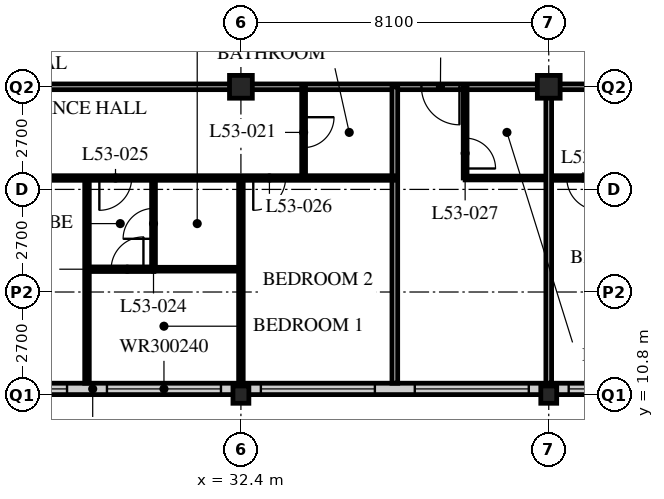
"""IFC4 building model, lengths in metres.
Left out: names, types, materials, properties, quantities, classifications, styles, units other than length and angle.
Written with IfcOpenShell. Run it as: python <this file> out.ifc"""

import sys

from ifc_helpers import new_model, si_unit, direction, frame, frame_2d, origin, origin_2d, place, context, subcontext, project, spatial, rectangle, hollow_rectangle, i_section, extrude, element, fill, save


model = new_model("IFC4")
c1 = context("Model", 3, precision=1e-05, world=origin(), true_north=direction((0.0, 1.0)))
c2 = subcontext(c1, "Body", "Model", "MODEL_VIEW")
j1 = project(units=[si_unit("LENGTHUNIT", "METRE"), si_unit("PLANEANGLEUNIT", "RADIAN")], contexts=[c1])
p1 = place(None, origin())
s1 = spatial("IfcSite", under=j1, at=p1, CompositionType="ELEMENT")
p2 = place(p1, origin())
s2 = spatial("IfcBuilding", under=s1, at=p2, CompositionType="ELEMENT")
p3 = place(p2, frame((0.0, 0.0, 206.4)))
s3 = spatial("IfcBuildingStorey", under=s2, at=p3, CompositionType="ELEMENT", Elevation=206.4)
p4 = place(p3, frame((32.4, 10.8, 0.0), z_axis=(0.0, 0.0, 1.0), x_axis=(1.0, 0.0, 0.0)))
e1 = element("IfcColumn", 1, at=p4, inside=s3, PredefinedType="COLUMN", context=c2, shape_type="SweptSolid", body=[
    extrude(i_section(OverallWidth=0.418, OverallDepth=0.456, WebThickness=0.042, FlangeThickness=0.067, FilletRadius=0.015, at=origin_2d()), origin(), (0.0, 0.0, 1.0), 3.6),
])
p5 = place(p3, frame((32.4, 18.9, 0.0), z_axis=(0.0, 0.0, 1.0), x_axis=(1.0, 0.0, 0.0)))
e2 = element("IfcColumn", 2, at=p5, inside=s3, PredefinedType="COLUMN", context=c2, shape_type="SweptSolid", body=[
    extrude(hollow_rectangle(XDim=0.6, YDim=0.6, WallThickness=0.05, at=origin_2d()), origin(), (0.0, 0.0, 1.0), 3.6),
])
p6 = place(p3, frame((40.5, 10.8, 0.0), z_axis=(0.0, 0.0, 1.0), x_axis=(1.0, 0.0, 0.0)))
e3 = element("IfcColumn", 3, at=p6, inside=s3, PredefinedType="COLUMN", context=c2, shape_type="SweptSolid", body=[
    extrude(i_section(OverallWidth=0.418, OverallDepth=0.456, WebThickness=0.042, FlangeThickness=0.067, FilletRadius=0.015, at=origin_2d()), origin(), (0.0, 0.0, 1.0), 3.6),
])
p7 = place(p3, frame((40.5, 18.9, 0.0), z_axis=(0.0, 0.0, 1.0), x_axis=(1.0, 0.0, 0.0)))
e4 = element("IfcColumn", 4, at=p7, inside=s3, PredefinedType="COLUMN", context=c2, shape_type="SweptSolid", body=[
    extrude(hollow_rectangle(XDim=0.6, YDim=0.6, WallThickness=0.05, at=origin_2d()), origin(), (0.0, 0.0, 1.0), 3.6),
])
p8 = place(p3, frame((8.4, 10.95, 0.0), z_axis=(0.0, 0.0, 1.0), x_axis=(1.0, 0.0, 0.0)))
e5 = element("IfcWall", 5, at=p8, inside=s3, PredefinedType="SOLIDWALL", context=c2, shape_type="SweptSolid", body=[
    extrude(rectangle(XDim=40.2, YDim=0.3, at=frame_2d((20.1, 0.0))), origin(), (0.0, 0.0, 1.0), 3.39),
])
p9 = place(p8, frame((0.225, 0.0, 0.6)))
e6 = element("IfcOpeningElement", 6, at=p9, cuts=e5, PredefinedType="OPENING", context=c2, shape_type="SweptSolid", body=[
    extrude(rectangle(XDim=3.0, YDim=2.4, at=frame_2d((1.5, 1.2))), frame((0.0, 0.16, 0.0), z_axis=(0.0, -1.0, 0.0), x_axis=(1.0, 0.0, 0.0)), (0.0, 0.0, 1.0), 0.32),
])
p10 = place(p8, frame((4.275, 0.0, 0.6)))
e7 = element("IfcOpeningElement", 7, at=p10, cuts=e5, PredefinedType="OPENING", context=c2, shape_type="SweptSolid", body=[
    extrude(rectangle(XDim=3.0, YDim=2.4, at=frame_2d((1.5, 1.2))), frame((0.0, 0.16, 0.0), z_axis=(0.0, -1.0, 0.0), x_axis=(1.0, 0.0, 0.0)), (0.0, 0.0, 1.0), 0.32),
])
p11 = place(p8, frame((8.325, 0.0, 0.6)))
e8 = element("IfcOpeningElement", 8, at=p11, cuts=e5, PredefinedType="OPENING", context=c2, shape_type="SweptSolid", body=[
    extrude(rectangle(XDim=3.0, YDim=2.4, at=frame_2d((1.5, 1.2))), frame((0.0, 0.16, 0.0), z_axis=(0.0, -1.0, 0.0), x_axis=(1.0, 0.0, 0.0)), (0.0, 0.0, 1.0), 0.32),
])
p12 = place(p8, frame((12.375, 0.0, 0.6)))
e9 = element("IfcOpeningElement", 9, at=p12, cuts=e5, PredefinedType="OPENING", context=c2, shape_type="SweptSolid", body=[
    extrude(rectangle(XDim=3.0, YDim=2.4, at=frame_2d((1.5, 1.2))), frame((0.0, 0.16, 0.0), z_axis=(0.0, -1.0, 0.0), x_axis=(1.0, 0.0, 0.0)), (0.0, 0.0, 1.0), 0.32),
])
p13 = place(p8, frame((16.425, 0.0, 0.6)))
e10 = element("IfcOpeningElement", 10, at=p13, cuts=e5, PredefinedType="OPENING", context=c2, shape_type="SweptSolid", body=[
    extrude(rectangle(XDim=3.0, YDim=2.4, at=frame_2d((1.5, 1.2))), frame((0.0, 0.16, 0.0), z_axis=(0.0, -1.0, 0.0), x_axis=(1.0, 0.0, 0.0)), (0.0, 0.0, 1.0), 0.32),
])
p14 = place(p8, frame((20.475, 0.0, 0.6)))
e11 = element("IfcOpeningElement", 11, at=p14, cuts=e5, PredefinedType="OPENING", context=c2, shape_type="SweptSolid", body=[
    extrude(rectangle(XDim=3.0, YDim=2.4, at=frame_2d((1.5, 1.2))), frame((0.0, 0.16, 0.0), z_axis=(0.0, -1.0, 0.0), x_axis=(1.0, 0.0, 0.0)), (0.0, 0.0, 1.0), 0.32),
])
p15 = place(p8, frame((24.525, 0.0, 0.6)))
e12 = element("IfcOpeningElement", 12, at=p15, cuts=e5, PredefinedType="OPENING", context=c2, shape_type="SweptSolid", body=[
    extrude(rectangle(XDim=3.0, YDim=2.4, at=frame_2d((1.5, 1.2))), frame((0.0, 0.16, 0.0), z_axis=(0.0, -1.0, 0.0), x_axis=(1.0, 0.0, 0.0)), (0.0, 0.0, 1.0), 0.32),
])
p16 = place(p8, frame((28.575, 0.0, 0.6)))
e13 = element("IfcOpeningElement", 13, at=p16, cuts=e5, PredefinedType="OPENING", context=c2, shape_type="SweptSolid", body=[
    extrude(rectangle(XDim=3.0, YDim=2.4, at=frame_2d((1.5, 1.2))), frame((0.0, 0.16, 0.0), z_axis=(0.0, -1.0, 0.0), x_axis=(1.0, 0.0, 0.0)), (0.0, 0.0, 1.0), 0.32),
])
p17 = place(p8, frame((32.625, 0.0, 0.6)))
e14 = element("IfcOpeningElement", 14, at=p17, cuts=e5, PredefinedType="OPENING", context=c2, shape_type="SweptSolid", body=[
    extrude(rectangle(XDim=3.0, YDim=2.4, at=frame_2d((1.5, 1.2))), frame((0.0, 0.16, 0.0), z_axis=(0.0, -1.0, 0.0), x_axis=(1.0, 0.0, 0.0)), (0.0, 0.0, 1.0), 0.32),
])
p18 = place(p8, frame((36.675, 0.0, 0.6)))
e15 = element("IfcOpeningElement", 15, at=p18, cuts=e5, PredefinedType="OPENING", context=c2, shape_type="SweptSolid", body=[
    extrude(rectangle(XDim=3.0, YDim=2.4, at=frame_2d((1.5, 1.2))), frame((0.0, 0.16, 0.0), z_axis=(0.0, -1.0, 0.0), x_axis=(1.0, 0.0, 0.0)), (0.0, 0.0, 1.0), 0.32),
])
p19 = place(p3, frame((8.1, 18.9, 0.0), z_axis=(0.0, 0.0, 1.0), x_axis=(1.0, 0.0, 0.0)))
e16 = element("IfcWall", 16, at=p19, inside=s3, PredefinedType="PARTITIONING", context=c2, shape_type="SweptSolid", body=[
    extrude(rectangle(XDim=36.45, YDim=0.15, at=frame_2d((18.225, 0.0))), origin(), (0.0, 0.0, 1.0), 2.778),
])
p20 = place(p19, frame((4.45, 0.0, 0.0)))
e17 = element("IfcOpeningElement", 17, at=p20, cuts=e16, PredefinedType="OPENING", context=c2, shape_type="SweptSolid", body=[
    extrude(rectangle(XDim=1.0, YDim=2.1, at=frame_2d((0.5, 1.05))), frame((0.0, 0.085, 0.0), z_axis=(0.0, -1.0, 0.0), x_axis=(1.0, 0.0, 0.0)), (0.0, 0.0, 1.0), 0.17),
])
p21 = place(p19, frame((12.55, 0.0, 0.0)))
e18 = element("IfcOpeningElement", 18, at=p21, cuts=e16, PredefinedType="OPENING", context=c2, shape_type="SweptSolid", body=[
    extrude(rectangle(XDim=1.0, YDim=2.1, at=frame_2d((0.5, 1.05))), frame((0.0, 0.085, 0.0), z_axis=(0.0, -1.0, 0.0), x_axis=(1.0, 0.0, 0.0)), (0.0, 0.0, 1.0), 0.17),
])
p22 = place(p19, frame((29.05, 0.0, 0.0)))
e19 = element("IfcOpeningElement", 19, at=p22, cuts=e16, PredefinedType="OPENING", context=c2, shape_type="SweptSolid", body=[
    extrude(rectangle(XDim=1.0, YDim=2.1, at=frame_2d((0.5, 1.05))), frame((0.0, 0.085, 0.0), z_axis=(0.0, -1.0, 0.0), x_axis=(1.0, 0.0, 0.0)), (0.0, 0.0, 1.0), 0.17),
])
p23 = place(p19, frame((2.625, 0.0, 0.0)))
e20 = element("IfcOpeningElement", 20, at=p23, cuts=e16, PredefinedType="OPENING", context=c2, shape_type="SweptSolid", body=[
    extrude(rectangle(XDim=1.0, YDim=2.1, at=frame_2d((0.5, 1.05))), frame((0.0, 0.085, 0.0), z_axis=(0.0, -1.0, 0.0), x_axis=(1.0, 0.0, 0.0)), (0.0, 0.0, 1.0), 0.17),
])
p24 = place(p19, frame((33.925, 0.0, 0.0)))
e21 = element("IfcOpeningElement", 21, at=p24, cuts=e16, PredefinedType="OPENING", context=c2, shape_type="SweptSolid", body=[
    extrude(rectangle(XDim=1.0, YDim=2.1, at=frame_2d((0.5, 1.05))), frame((0.0, 0.085, 0.0), z_axis=(0.0, -1.0, 0.0), x_axis=(1.0, 0.0, 0.0)), (0.0, 0.0, 1.0), 0.17),
])
p25 = place(p3, frame((34.05, 18.9, 0.0), z_axis=(0.0, 0.0, 1.0), x_axis=(0.0, -1.0, 0.0)))
e22 = element("IfcWall", 22, at=p25, inside=s3, PredefinedType="PARTITIONING", context=c2, shape_type="SweptSolid", body=[
    extrude(rectangle(XDim=2.4, YDim=0.1, at=frame_2d((1.2, 0.0))), origin(), (0.0, 0.0, 1.0), 3.39),
])
p26 = place(p25, frame((0.8, 0.0, 0.0)))
e23 = element("IfcOpeningElement", 23, at=p26, cuts=e22, PredefinedType="OPENING", context=c2, shape_type="SweptSolid", body=[
    extrude(rectangle(XDim=0.8, YDim=2.1, at=frame_2d((0.4, 1.05))), frame((0.0, 0.06, 0.0), z_axis=(0.0, -1.0, 0.0), x_axis=(1.0, 0.0, 0.0)), (0.0, 0.0, 1.0), 0.12),
])
p27 = place(p3, frame((30.1, 16.5, 0.0), z_axis=(0.0, 0.0, 1.0), x_axis=(0.0, -1.0, 0.0)))
e24 = element("IfcWall", 24, at=p27, inside=s3, PredefinedType="PARTITIONING", context=c2, shape_type="SweptSolid", body=[
    extrude(rectangle(XDim=2.4, YDim=0.1, at=frame_2d((1.2, 0.0))), origin(), (0.0, 0.0, 1.0), 3.39),
])
p28 = place(p27, frame((0.8, 0.0, 0.0)))
e25 = element("IfcOpeningElement", 25, at=p28, cuts=e24, PredefinedType="OPENING", context=c2, shape_type="SweptSolid", body=[
    extrude(rectangle(XDim=0.8, YDim=2.1, at=frame_2d((0.4, 1.05))), frame((0.0, 0.06, 0.0), z_axis=(0.0, -1.0, 0.0), x_axis=(1.0, 0.0, 0.0)), (0.0, 0.0, 1.0), 0.12),
])
p29 = place(p3, frame((30.1, 14.1, 0.0), z_axis=(0.0, 0.0, 1.0), x_axis=(1.0, 0.0, 0.0)))
e26 = element("IfcWall", 26, at=p29, inside=s3, PredefinedType="PARTITIONING", context=c2, shape_type="SweptSolid", body=[
    extrude(rectangle(XDim=2.3, YDim=0.1, at=frame_2d((1.15, 0.0))), origin(), (0.0, 0.0, 1.0), 3.39),
])
p30 = place(p3, frame((28.35, 16.5, 0.0), z_axis=(0.0, 0.0, 1.0), x_axis=(0.0, -1.0, 0.0)))
e27 = element("IfcWall", 27, at=p30, inside=s3, PredefinedType="PARTITIONING", context=c2, shape_type="SweptSolid", body=[
    extrude(rectangle(XDim=5.4, YDim=0.12, at=frame_2d((2.7, 0.0))), origin(), (0.0, 0.0, 1.0), 3.39),
])
p31 = place(p3, frame((32.4, 16.5, 0.0), z_axis=(0.0, 0.0, 1.0), x_axis=(0.0, -1.0, 0.0)))
e28 = element("IfcWall", 28, at=p31, inside=s3, PredefinedType="PARTITIONING", context=c2, shape_type="SweptSolid", body=[
    extrude(rectangle(XDim=5.4, YDim=0.12, at=frame_2d((2.7, 0.0))), origin(), (0.0, 0.0, 1.0), 2.778),
])
p32 = place(p3, frame((36.45, 18.9, 0.0), z_axis=(0.0, 0.0, 1.0), x_axis=(0.0, -1.0, 0.0)))
e29 = element("IfcWall", 29, at=p32, inside=s3, PredefinedType="PARTITIONING", context=c2, shape_type="SweptSolid", body=[
    extrude(rectangle(XDim=7.8, YDim=0.15, at=frame_2d((3.9, 0.0))), origin(), (0.0, 0.0, 1.0), 3.39),
])
p33 = place(p3, frame((38.3, 16.5, 0.0), z_axis=(0.0, 0.0, 1.0), x_axis=(1.0, 0.0, 0.0)))
e30 = element("IfcWall", 30, at=p33, inside=s3, PredefinedType="PARTITIONING", context=c2, shape_type="SweptSolid", body=[
    extrude(rectangle(XDim=2.2, YDim=0.1, at=frame_2d((1.1, 0.0))), origin(), (0.0, 0.0, 1.0), 3.39),
])
p34 = place(p3, frame((38.3, 18.9, 0.0), z_axis=(0.0, 0.0, 1.0), x_axis=(0.0, -1.0, 0.0)))
e31 = element("IfcWall", 31, at=p34, inside=s3, PredefinedType="PARTITIONING", context=c2, shape_type="SweptSolid", body=[
    extrude(rectangle(XDim=2.4, YDim=0.1, at=frame_2d((1.2, 0.0))), origin(), (0.0, 0.0, 1.0), 3.39),
])
p35 = place(p34, frame((1.35, 0.0, 0.0)))
e32 = element("IfcOpeningElement", 32, at=p35, cuts=e31, PredefinedType="OPENING", context=c2, shape_type="SweptSolid", body=[
    extrude(rectangle(XDim=0.8, YDim=2.1, at=frame_2d((0.4, 1.05))), frame((0.0, 0.06, 0.0), z_axis=(0.0, -1.0, 0.0), x_axis=(1.0, 0.0, 0.0)), (0.0, 0.0, 1.0), 0.12),
])
p36 = place(p3, frame((8.1, 16.5, 0.0), z_axis=(0.0, 0.0, 1.0), x_axis=(1.0, 0.0, 0.0)))
e33 = element("IfcWall", 33, at=p36, inside=s3, PredefinedType="PARTITIONING", context=c2, shape_type="SweptSolid", body=[
    extrude(rectangle(XDim=28.35, YDim=0.12, at=frame_2d((14.175, 0.0))), origin(), (0.0, 0.0, 1.0), 3.39),
])
p37 = place(p36, frame((5.025, 0.0, 0.0)))
e34 = element("IfcOpeningElement", 34, at=p37, cuts=e33, PredefinedType="OPENING", context=c2, shape_type="SweptSolid", body=[
    extrude(rectangle(XDim=0.85, YDim=2.1, at=frame_2d((0.425, 1.05))), frame((0.0, 0.07, 0.0), z_axis=(0.0, -1.0, 0.0), x_axis=(1.0, 0.0, 0.0)), (0.0, 0.0, 1.0), 0.14),
])
p38 = place(p36, frame((8.425, 0.0, 0.0)))
e35 = element("IfcOpeningElement", 35, at=p38, cuts=e33, PredefinedType="OPENING", context=c2, shape_type="SweptSolid", body=[
    extrude(rectangle(XDim=0.85, YDim=2.1, at=frame_2d((0.425, 1.05))), frame((0.0, 0.07, 0.0), z_axis=(0.0, -1.0, 0.0), x_axis=(1.0, 0.0, 0.0)), (0.0, 0.0, 1.0), 0.14),
])
p39 = place(p36, frame((13.125, 0.0, 0.0)))
e36 = element("IfcOpeningElement", 36, at=p39, cuts=e33, PredefinedType="OPENING", context=c2, shape_type="SweptSolid", body=[
    extrude(rectangle(XDim=0.85, YDim=2.1, at=frame_2d((0.425, 1.05))), frame((0.0, 0.07, 0.0), z_axis=(0.0, -1.0, 0.0), x_axis=(1.0, 0.0, 0.0)), (0.0, 0.0, 1.0), 0.14),
])
p40 = place(p36, frame((20.575, 0.0, 0.0)))
e37 = element("IfcOpeningElement", 37, at=p40, cuts=e33, PredefinedType="OPENING", context=c2, shape_type="SweptSolid", body=[
    extrude(rectangle(XDim=0.85, YDim=2.1, at=frame_2d((0.425, 1.05))), frame((0.0, 0.07, 0.0), z_axis=(0.0, -1.0, 0.0), x_axis=(1.0, 0.0, 0.0)), (0.0, 0.0, 1.0), 0.14),
])
p41 = place(p36, frame((24.625, 0.0, 0.0)))
e38 = element("IfcOpeningElement", 38, at=p41, cuts=e33, PredefinedType="OPENING", context=c2, shape_type="SweptSolid", body=[
    extrude(rectangle(XDim=0.85, YDim=2.1, at=frame_2d((0.425, 1.05))), frame((0.0, 0.07, 0.0), z_axis=(0.0, -1.0, 0.0), x_axis=(1.0, 0.0, 0.0)), (0.0, 0.0, 1.0), 0.14),
])
p42 = place(p36, frame((2.725, 0.0, 0.0)))
e39 = element("IfcOpeningElement", 39, at=p42, cuts=e33, PredefinedType="OPENING", context=c2, shape_type="SweptSolid", body=[
    extrude(rectangle(XDim=0.85, YDim=2.1, at=frame_2d((0.425, 1.05))), frame((0.0, 0.07, 0.0), z_axis=(0.0, -1.0, 0.0), x_axis=(1.0, 0.0, 0.0)), (0.0, 0.0, 1.0), 0.14),
])
p43 = place(p3, frame((40.5, 16.5, 0.0), z_axis=(0.0, 0.0, 1.0), x_axis=(1.0, 0.0, 0.0)))
e40 = element("IfcWall", 40, at=p43, inside=s3, PredefinedType="PARTITIONING", context=c2, shape_type="SweptSolid", body=[
    extrude(rectangle(XDim=8.05, YDim=0.12, at=frame_2d((4.025, 0.0))), origin(), (0.0, 0.0, 1.0), 3.39),
])
p44 = place(p43, frame((0.475, 0.0, 0.0)))
e41 = element("IfcOpeningElement", 41, at=p44, cuts=e40, PredefinedType="OPENING", context=c2, shape_type="SweptSolid", body=[
    extrude(rectangle(XDim=0.85, YDim=2.1, at=frame_2d((0.425, 1.05))), frame((0.0, 0.07, 0.0), z_axis=(0.0, -1.0, 0.0), x_axis=(1.0, 0.0, 0.0)), (0.0, 0.0, 1.0), 0.14),
])
p45 = place(p43, frame((4.325, 0.0, 0.0)))
e42 = element("IfcOpeningElement", 42, at=p45, cuts=e40, PredefinedType="OPENING", context=c2, shape_type="SweptSolid", body=[
    extrude(rectangle(XDim=0.85, YDim=2.1, at=frame_2d((0.425, 1.05))), frame((0.0, 0.07, 0.0), z_axis=(0.0, -1.0, 0.0), x_axis=(1.0, 0.0, 0.0)), (0.0, 0.0, 1.0), 0.14),
])
p46 = place(p3, frame((40.5, 18.9, 0.0), z_axis=(0.0, 0.0, 1.0), x_axis=(0.0, -1.0, 0.0)))
e43 = element("IfcWall", 43, at=p46, inside=s3, PredefinedType="PARTITIONING", context=c2, shape_type="SweptSolid", body=[
    extrude(rectangle(XDim=7.8, YDim=0.15, at=frame_2d((3.9, 0.0))), origin(), (0.0, 0.0, 1.0), 2.778),
])
p47 = place(p3, frame((30.11, 14.1, 0.0), z_axis=(0.0, 0.0, 1.0), x_axis=(-1.0, 0.0, 0.0)))
e44 = element("IfcWall", 44, at=p47, inside=s3, PredefinedType="PARTITIONING", context=c2, shape_type="SweptSolid", body=[
    extrude(rectangle(XDim=1.76, YDim=0.12, at=frame_2d((0.88, 0.0))), origin(), (0.0, 0.0, 1.0), 3.39),
])
p48 = place(p47, frame((0.275, 0.0, 0.0)))
e45 = element("IfcOpeningElement", 45, at=p48, cuts=e44, PredefinedType="OPENING", context=c2, shape_type="SweptSolid", body=[
    extrude(rectangle(XDim=0.85, YDim=2.1, at=frame_2d((0.425, 1.05))), frame((0.0, 0.07, 0.0), z_axis=(0.0, -1.0, 0.0), x_axis=(1.0, 0.0, 0.0)), (0.0, 0.0, 1.0), 0.14),
])
p49 = place(p13, origin())
e46 = element("IfcWindow", 46, at=p49, inside=s3, PartitioningType="SINGLE_PANEL", PredefinedType="WINDOW", context=c2, shape_type="SweptSolid", body=[
    extrude(rectangle(XDim=3.0, YDim=2.4, at=frame_2d((1.5, 1.2))), frame((0.0, 0.03, 0.0), z_axis=(0.0, -1.0, 0.0), x_axis=(1.0, 0.0, 0.0)), (0.0, 0.0, 1.0), 0.06),
])
fill(e10, e46)
p50 = place(p14, origin())
e47 = element("IfcWindow", 47, at=p50, inside=s3, PartitioningType="SINGLE_PANEL", PredefinedType="WINDOW", context=c2, shape_type="SweptSolid", body=[
    extrude(rectangle(XDim=3.0, YDim=2.4, at=frame_2d((1.5, 1.2))), frame((0.0, 0.03, 0.0), z_axis=(0.0, -1.0, 0.0), x_axis=(1.0, 0.0, 0.0)), (0.0, 0.0, 1.0), 0.06),
])
fill(e11, e47)
p51 = place(p15, origin())
e48 = element("IfcWindow", 48, at=p51, inside=s3, PartitioningType="SINGLE_PANEL", PredefinedType="WINDOW", context=c2, shape_type="SweptSolid", body=[
    extrude(rectangle(XDim=3.0, YDim=2.4, at=frame_2d((1.5, 1.2))), frame((0.0, 0.03, 0.0), z_axis=(0.0, -1.0, 0.0), x_axis=(1.0, 0.0, 0.0)), (0.0, 0.0, 1.0), 0.06),
])
fill(e12, e48)
p52 = place(p16, origin())
e49 = element("IfcWindow", 49, at=p52, inside=s3, PartitioningType="SINGLE_PANEL", PredefinedType="WINDOW", context=c2, shape_type="SweptSolid", body=[
    extrude(rectangle(XDim=3.0, YDim=2.4, at=frame_2d((1.5, 1.2))), frame((0.0, 0.03, 0.0), z_axis=(0.0, -1.0, 0.0), x_axis=(1.0, 0.0, 0.0)), (0.0, 0.0, 1.0), 0.06),
])
fill(e13, e49)
p53 = place(p17, origin())
e50 = element("IfcWindow", 50, at=p53, inside=s3, PartitioningType="SINGLE_PANEL", PredefinedType="WINDOW", context=c2, shape_type="SweptSolid", body=[
    extrude(rectangle(XDim=3.0, YDim=2.4, at=frame_2d((1.5, 1.2))), frame((0.0, 0.03, 0.0), z_axis=(0.0, -1.0, 0.0), x_axis=(1.0, 0.0, 0.0)), (0.0, 0.0, 1.0), 0.06),
])
fill(e14, e50)
p54 = place(p26, origin())
e51 = element("IfcDoor", 51, at=p54, inside=s3, OperationType="SINGLE_SWING_LEFT", PredefinedType="DOOR", context=c2, shape_type="SweptSolid", body=[
    extrude(rectangle(XDim=0.8, YDim=2.1, at=frame_2d((0.4, 1.05))), frame((0.0, 0.025, 0.0), z_axis=(0.0, -1.0, 0.0), x_axis=(1.0, 0.0, 0.0)), (0.0, 0.0, 1.0), 0.05),
])
fill(e23, e51)
p55 = place(p28, origin())
e52 = element("IfcDoor", 52, at=p55, inside=s3, OperationType="SINGLE_SWING_LEFT", PredefinedType="DOOR", context=c2, shape_type="SweptSolid", body=[
    extrude(rectangle(XDim=0.8, YDim=2.1, at=frame_2d((0.4, 1.05))), frame((0.0, 0.025, 0.0), z_axis=(0.0, -1.0, 0.0), x_axis=(1.0, 0.0, 0.0)), (0.0, 0.0, 1.0), 0.05),
])
fill(e25, e52)
p56 = place(p40, origin())
e53 = element("IfcDoor", 53, at=p56, inside=s3, OperationType="SINGLE_SWING_RIGHT", PredefinedType="DOOR", context=c2, shape_type="SweptSolid", body=[
    extrude(rectangle(XDim=0.85, YDim=2.1, at=frame_2d((0.425, 1.05))), frame((0.0, 0.025, 0.0), z_axis=(0.0, -1.0, 0.0), x_axis=(1.0, 0.0, 0.0)), (0.0, 0.0, 1.0), 0.05),
])
fill(e37, e53)
p57 = place(p41, origin())
e54 = element("IfcDoor", 54, at=p57, inside=s3, OperationType="SINGLE_SWING_RIGHT", PredefinedType="DOOR", context=c2, shape_type="SweptSolid", body=[
    extrude(rectangle(XDim=0.85, YDim=2.1, at=frame_2d((0.425, 1.05))), frame((0.0, 0.025, 0.0), z_axis=(0.0, -1.0, 0.0), x_axis=(1.0, 0.0, 0.0)), (0.0, 0.0, 1.0), 0.05),
])
fill(e38, e54)
p58 = place(p35, origin())
e55 = element("IfcDoor", 55, at=p58, inside=s3, OperationType="SINGLE_SWING_RIGHT", PredefinedType="DOOR", context=c2, shape_type="SweptSolid", body=[
    extrude(rectangle(XDim=0.8, YDim=2.1, at=frame_2d((0.4, 1.05))), frame((0.0, 0.025, 0.0), z_axis=(0.0, -1.0, 0.0), x_axis=(1.0, 0.0, 0.0)), (0.0, 0.0, 1.0), 0.05),
])
fill(e32, e55)
p59 = place(p22, origin())
e56 = element("IfcDoor", 56, at=p59, inside=s3, OperationType="SINGLE_SWING_LEFT", PredefinedType="DOOR", context=c2, shape_type="SweptSolid", body=[
    extrude(rectangle(XDim=1.0, YDim=2.1, at=frame_2d((0.5, 1.05))), frame((0.0, 0.025, 0.0), z_axis=(0.0, -1.0, 0.0), x_axis=(1.0, 0.0, 0.0)), (0.0, 0.0, 1.0), 0.05),
])
fill(e19, e56)
p60 = place(p44, origin())
e57 = element("IfcDoor", 57, at=p60, inside=s3, OperationType="SINGLE_SWING_LEFT", PredefinedType="DOOR", context=c2, shape_type="SweptSolid", body=[
    extrude(rectangle(XDim=0.85, YDim=2.1, at=frame_2d((0.425, 1.05))), frame((0.0, 0.025, 0.0), z_axis=(0.0, -1.0, 0.0), x_axis=(1.0, 0.0, 0.0)), (0.0, 0.0, 1.0), 0.05),
])
fill(e41, e57)
p61 = place(p48, origin())
e58 = element("IfcDoor", 58, at=p61, inside=s3, OperationType="SINGLE_SWING_RIGHT", PredefinedType="DOOR", context=c2, shape_type="SweptSolid", body=[
    extrude(rectangle(XDim=0.85, YDim=2.1, at=frame_2d((0.425, 1.05))), frame((0.0, 0.025, 0.0), z_axis=(0.0, -1.0, 0.0), x_axis=(1.0, 0.0, 0.0)), (0.0, 0.0, 1.0), 0.05),
])
fill(e45, e58)
save(model, sys.argv[1])
